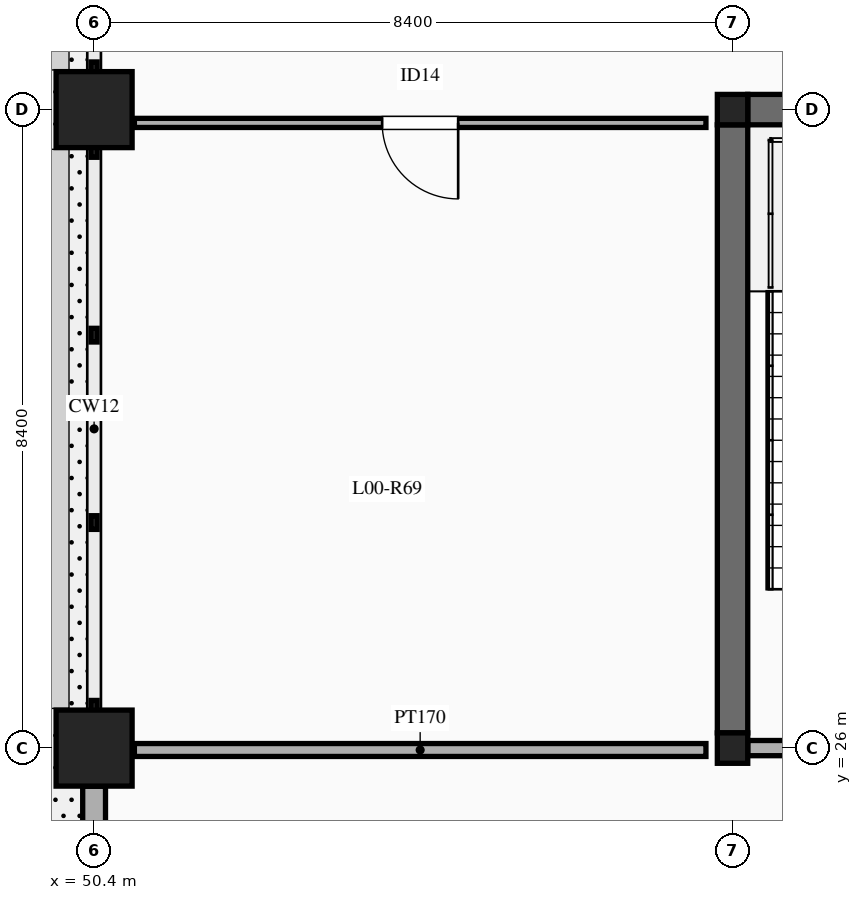
"""IFC4 building model, lengths in metres.
Left out: names, types, materials, properties, quantities, classifications, styles, units other than length and angle.
Written with IfcOpenShell. Run it as: python <this file> out.ifc"""

import sys

from ifc_helpers import new_model, si_unit, direction, frame, frame_2d, origin, origin_2d, place, context, subcontext, project, spatial, rectangle, extrude, element, fill, save


model = new_model("IFC4")
c1 = context("Model", 3, precision=1e-05, world=origin(), true_north=direction((0.0, 1.0)))
c2 = subcontext(c1, "Body", "Model", "MODEL_VIEW")
j1 = project(units=[si_unit("LENGTHUNIT", "METRE"), si_unit("PLANEANGLEUNIT", "RADIAN")], contexts=[c1])
p1 = place(None, origin())
s1 = spatial("IfcSite", under=j1, at=p1, CompositionType="ELEMENT")
p2 = place(p1, origin())
s2 = spatial("IfcBuilding", under=s1, at=p2, CompositionType="ELEMENT")
p3 = place(p2, origin())
s3 = spatial("IfcBuildingStorey", under=s2, at=p3, CompositionType="ELEMENT", Elevation=0.0)
for number, where, z_axis, x_axis in (
    (1, (50.4, 26.0, 0.0), (0.0, 0.0, 1.0), (1.0, 0.0, 0.0)),
    (2, (50.4, 34.4, 0.0), (0.0, 0.0, 1.0), (1.0, 0.0, 0.0)),
):
    element("IfcColumn", number, at=place(p3, frame(where, z_axis=z_axis, x_axis=x_axis)), inside=s3, PredefinedType="COLUMN", context=c2, shape_type="SweptSolid", body=[
        extrude(rectangle(XDim=1.0, YDim=1.0, at=origin_2d()), origin(), (0.0, 0.0, 1.0), 5.4),
    ])
for number, where, z_axis, x_axis in (
    (3, (58.8, 26.0, 0.0), (0.0, 0.0, 1.0), (1.0, 0.0, 0.0)),
    (4, (58.8, 34.4, 0.0), (0.0, 0.0, 1.0), (1.0, 0.0, 0.0)),
):
    element("IfcColumn", number, at=place(p3, frame(where, z_axis=z_axis, x_axis=x_axis)), inside=s3, PredefinedType="COLUMN", context=c2, shape_type="SweptSolid", body=[
        extrude(rectangle(XDim=0.4, YDim=0.4, at=origin_2d()), origin(), (0.0, 0.0, 1.0), 5.4),
    ])
for number, where, z_axis, x_axis in (
    (5, (58.8, 26.2, 0.0), (0.0, 0.0, 1.0), (0.0, 1.0, 0.0)),
    (6, (59.0, 34.4, 0.0), (0.0, 0.0, 1.0), (1.0, 0.0, 0.0)),
):
    element("IfcWall", number, at=place(p3, frame(where, z_axis=z_axis, x_axis=x_axis)), inside=s3, PredefinedType="SHEAR", context=c2, shape_type="SweptSolid", body=[
        extrude(rectangle(XDim=8.0, YDim=0.4, at=frame_2d((4.0, 0.0))), origin(), (0.0, 0.0, 1.0), 5.4),
    ])
p4 = place(p3, frame((50.4, 18.102, 0.0), z_axis=(0.0, 0.0, 1.0), x_axis=(0.0, 1.0, 0.0)))
e7 = element("IfcWall", 7, at=p4, inside=s3, PredefinedType="SOLIDWALL", context=c2, shape_type="SweptSolid", body=[
    extrude(rectangle(XDim=7.396, YDim=0.3, at=frame_2d((3.698, 0.0))), origin(), (0.0, 0.0, 1.0), 4.45),
])
p5 = place(p4, frame((5.173, 0.0, 0.0)))
e8 = element("IfcOpeningElement", 8, at=p5, cuts=e7, PredefinedType="OPENING", context=c2, shape_type="SweptSolid", body=[
    extrude(rectangle(XDim=1.75, YDim=2.35, at=frame_2d((0.875, 1.175))), frame((0.0, 0.16, 0.0), z_axis=(0.0, -1.0, 0.0), x_axis=(1.0, 0.0, 0.0)), (0.0, 0.0, 1.0), 0.32),
])
p6 = place(p4, frame((1.049, 0.0, 0.9)))
e9 = element("IfcOpeningElement", 9, at=p6, cuts=e7, PredefinedType="OPENING", context=c2, shape_type="SweptSolid", body=[
    extrude(rectangle(XDim=1.6, YDim=2.1, at=frame_2d((0.8, 1.05))), frame((0.0, 0.16, 0.0), z_axis=(0.0, -1.0, 0.0), x_axis=(1.0, 0.0, 0.0)), (0.0, 0.0, 1.0), 0.32),
])
p7 = place(p3, frame((59.0, 26.0, 0.0), z_axis=(0.0, 0.0, 1.0), x_axis=(1.0, 0.0, 0.0)))
e10 = element("IfcWall", 10, at=p7, inside=s3, PredefinedType="SOLIDWALL", context=c2, shape_type="SweptSolid", body=[
    extrude(rectangle(XDim=8.0, YDim=0.2, at=frame_2d((4.0, 0.0))), origin(), (0.0, 0.0, 1.0), 4.53),
])
p8 = place(p7, frame((1.55, 0.0, 0.0)))
e11 = element("IfcOpeningElement", 11, at=p8, cuts=e10, PredefinedType="OPENING", context=c2, shape_type="SweptSolid", body=[
    extrude(rectangle(XDim=1.15, YDim=2.15, at=frame_2d((0.575, 1.075))), frame((0.0, 0.11, 0.0), z_axis=(0.0, -1.0, 0.0), x_axis=(1.0, 0.0, 0.0)), (0.0, 0.0, 1.0), 0.22),
])
p9 = place(p7, frame((5.35, 0.0, 0.0)))
e12 = element("IfcOpeningElement", 12, at=p9, cuts=e10, PredefinedType="OPENING", context=c2, shape_type="SweptSolid", body=[
    extrude(rectangle(XDim=1.22, YDim=2.15, at=frame_2d((0.61, 1.075))), frame((0.0, 0.11, 0.0), z_axis=(0.0, -1.0, 0.0), x_axis=(1.0, 0.0, 0.0)), (0.0, 0.0, 1.0), 0.22),
])
p10 = place(p3, frame((50.93, 25.975, 0.0), z_axis=(0.0, 0.0, 1.0), x_axis=(1.0, 0.0, 0.0)))
e13 = element("IfcWall", 13, at=p10, inside=s3, PredefinedType="PARTITIONING", context=c2, shape_type="SweptSolid", body=[
    extrude(rectangle(XDim=7.52, YDim=0.17, at=frame_2d((3.76, 0.0))), origin(), (0.0, 0.0, 1.0), 4.35),
])
p11 = place(p3, frame((50.93, 34.225, 0.0), z_axis=(0.0, 0.0, 1.0), x_axis=(1.0, 0.0, 0.0)))
e14 = element("IfcWall", 14, at=p11, inside=s3, PredefinedType="PARTITIONING", context=c2, shape_type="SweptSolid", body=[
    extrude(rectangle(XDim=7.52, YDim=0.12, at=frame_2d((3.76, 0.0))), origin(), (0.0, 0.0, 1.0), 4.35),
])
p12 = place(p11, frame((3.26, 0.0, 0.0)))
e15 = element("IfcOpeningElement", 15, at=p12, cuts=e14, PredefinedType="OPENING", context=c2, shape_type="SweptSolid", body=[
    extrude(rectangle(XDim=1.0, YDim=2.15, at=frame_2d((0.5, 1.075))), frame((0.0, 0.07, 0.0), z_axis=(0.0, -1.0, 0.0), x_axis=(1.0, 0.0, 0.0)), (0.0, 0.0, 1.0), 0.14),
])
p13 = place(p12, frame((1.0, 0.0, 0.0), z_axis=(0.0, 0.0, 1.0), x_axis=(-1.0, 0.0, 0.0)))
e16 = element("IfcDoor", 16, at=p13, inside=s3, OperationType="SINGLE_SWING_LEFT", PredefinedType="DOOR", context=c2, shape_type="SweptSolid", body=[
    extrude(rectangle(XDim=1.0, YDim=2.15, at=frame_2d((0.5, 1.075))), frame((0.0, 0.025, 0.0), z_axis=(0.0, -1.0, 0.0), x_axis=(1.0, 0.0, 0.0)), (0.0, 0.0, 1.0), 0.05),
])
fill(e15, e16)
save(model, sys.argv[1])
